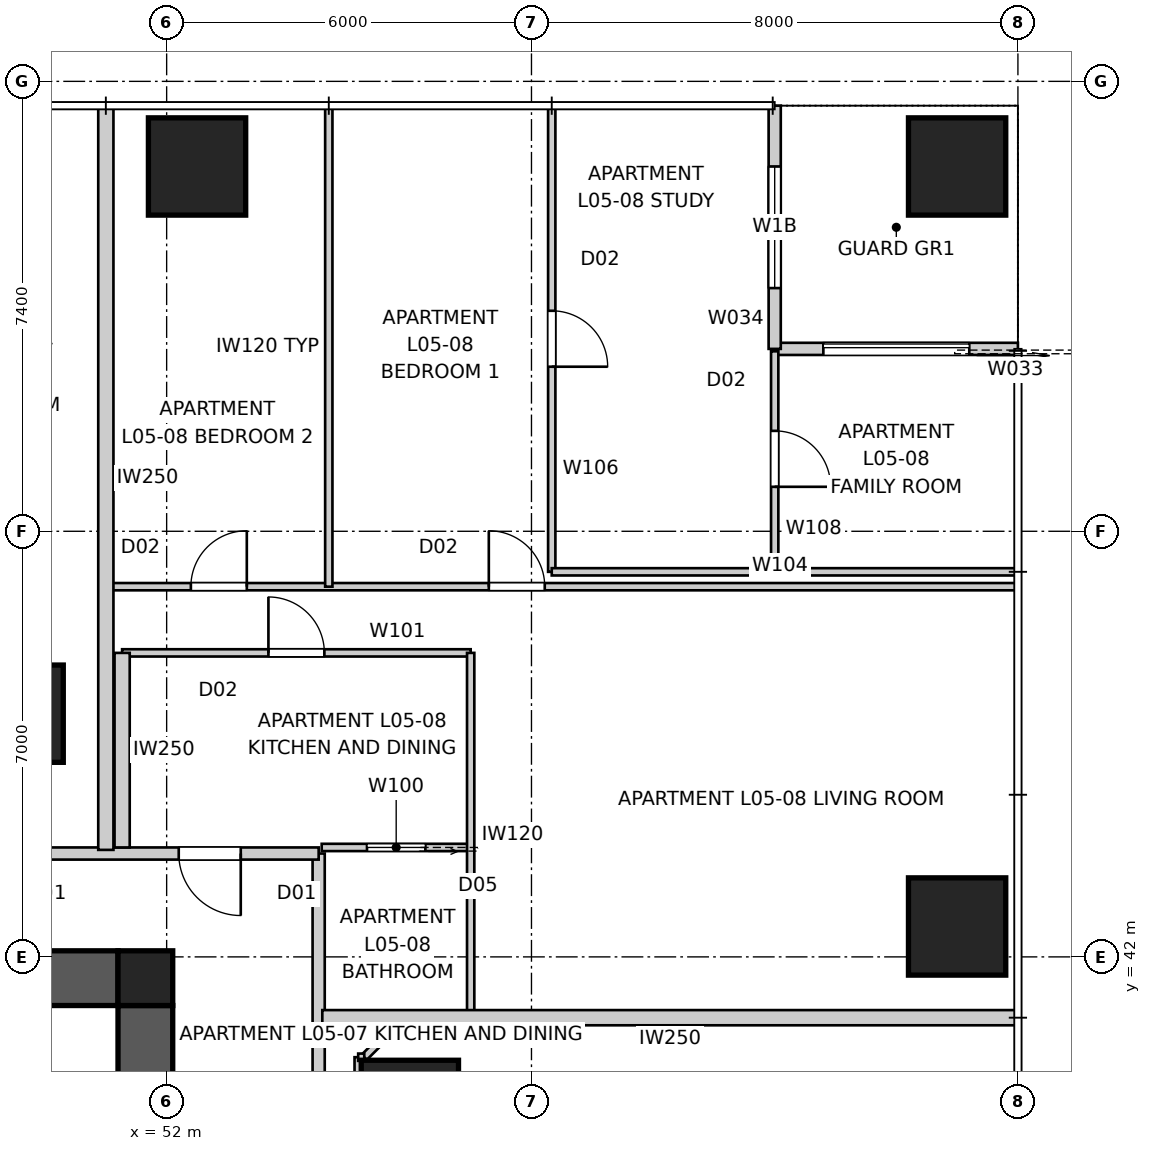
"""IFC4 building model, lengths in metres.
Left out: names, types, materials, properties, quantities, classifications, styles, units other than length and angle.
Written with IfcOpenShell. Run it as: python <this file> out.ifc"""

import sys

from ifc_helpers import new_model, si_unit, direction, frame, frame_2d, origin, origin_2d, place, context, subcontext, project, spatial, polyline, rectangle, outline, extrude, element, fill, save


model = new_model("IFC4")
c1 = context("Model", 3, precision=1e-05, world=origin(), true_north=direction((0.0, 1.0)))
c2 = subcontext(c1, "Body", "Model", "MODEL_VIEW")
j1 = project(units=[si_unit("LENGTHUNIT", "METRE"), si_unit("PLANEANGLEUNIT", "RADIAN")], contexts=[c1])
p1 = place(None, origin())
s1 = spatial("IfcSite", under=j1, at=p1, CompositionType="ELEMENT")
p2 = place(p1, origin())
s2 = spatial("IfcBuilding", under=s1, at=p2, CompositionType="ELEMENT")
p3 = place(p2, frame((0.0, 0.0, 21.8)))
s3 = spatial("IfcBuildingStorey", under=s2, at=p3, CompositionType="ELEMENT", Elevation=21.8)
p4 = place(p3, frame((28.8, 41.65, 0.0), z_axis=(0.0, 0.0, 1.0), x_axis=(1.0, 0.0, 0.0)))
e1 = element("IfcWall", 1, at=p4, inside=s3, PredefinedType="SHEAR", context=c2, shape_type="SweptSolid", body=[
    extrude(outline(polyline([(0.0, -0.45), (22.4, -0.45), (22.4, -0.025), (22.85, -0.025), (22.85, 0.025), (22.4, 0.025), (22.4, 0.45), (0.0, 0.45), (0.0, 0.025), (-0.45, 0.025), (-0.45, -0.025), (0.0, -0.025), (0.0, -0.45)])), origin(), (0.0, 0.0, 1.0), 3.4),
])
p5 = place(p3, frame((51.65, 18.8, 0.0), z_axis=(0.0, 0.0, 1.0), x_axis=(0.0, 1.0, 0.0)))
e2 = element("IfcWall", 2, at=p5, inside=s3, PredefinedType="SHEAR", context=c2, shape_type="SweptSolid", body=[
    extrude(outline(polyline([(0.0, -0.45), (22.4, -0.45), (22.4, -0.025), (22.85, -0.025), (22.85, 0.025), (22.4, 0.025), (22.4, 0.45), (0.0, 0.45), (0.0, 0.025), (-0.45, 0.025), (-0.45, -0.025), (0.0, -0.025), (0.0, -0.45)])), origin(), (0.0, 0.0, 1.0), 3.4),
])
p6 = place(p5, frame((11.14, 0.0, 0.0)))
e3 = element("IfcOpeningElement", 3, at=p6, cuts=e2, PredefinedType="OPENING", context=c2, shape_type="SweptSolid", body=[
    extrude(rectangle(XDim=1.02, YDim=2.4, at=frame_2d((0.51, 1.2))), frame((0.0, 0.46, 0.0), z_axis=(0.0, -1.0, 0.0), x_axis=(1.0, 0.0, 0.0)), (0.0, 0.0, 1.0), 0.92),
])
p7 = place(p3, frame((51.65, 41.65, 0.0), z_axis=(0.0, 0.0, 1.0), x_axis=(1.0, 0.0, 0.0)))
e4 = element("IfcColumn", 4, at=p7, inside=s3, PredefinedType="COLUMN", context=c2, shape_type="SweptSolid", body=[
    extrude(rectangle(XDim=0.9, YDim=0.9, at=origin_2d()), origin(), (0.0, 0.0, 1.0), 3.4),
])
for number, where, z_axis, x_axis in (
    (5, (65.0, 42.5, 0.0), (0.0, 0.0, 1.0), (1.0, 0.0, 0.0)),
    (6, (65.0, 55.0, 0.0), (0.0, 0.0, 1.0), (1.0, 0.0, 0.0)),
    (7, (52.5, 55.0, 0.0), (0.0, 0.0, 1.0), (1.0, 0.0, 0.0)),
    (8, (56.0, 39.5, 0.0), (0.0, 0.0, 1.0), (1.0, 0.0, 0.0)),
    (9, (49.5, 46.0, 0.0), (0.0, 0.0, 1.0), (1.0, 0.0, 0.0)),
):
    element("IfcColumn", number, at=place(p3, frame(where, z_axis=z_axis, x_axis=x_axis)), inside=s3, PredefinedType="COLUMN", context=c2, shape_type="SweptSolid", body=[
        extrude(rectangle(XDim=1.6, YDim=1.6, at=origin_2d()), origin(), (0.0, 0.0, 1.0), 3.4),
    ])
p8 = place(p3, frame((66.0, 52.0, 0.0), z_axis=(0.0, 0.0, 1.0), x_axis=(-1.0, 0.0, 0.0)))
e10 = element("IfcWall", 10, at=p8, inside=s3, PredefinedType="SOLIDWALL", context=c2, shape_type="SweptSolid", body=[
    extrude(rectangle(XDim=4.0, YDim=0.2, at=frame_2d((2.0, 0.0))), origin(), (0.0, 0.0, 1.0), 3.25),
])
p9 = place(p8, frame((0.8, 0.0, 0.0)))
e11 = element("IfcOpeningElement", 11, at=p9, cuts=e10, PredefinedType="OPENING", context=c2, shape_type="SweptSolid", body=[
    extrude(rectangle(XDim=2.4, YDim=2.1, at=frame_2d((1.2, 1.05))), frame((0.0, 0.11, 0.0), z_axis=(0.0, -1.0, 0.0), x_axis=(1.0, 0.0, 0.0)), (0.0, 0.0, 1.0), 0.22),
])
p10 = place(p3, frame((62.0, 52.0, 0.0), z_axis=(0.0, 0.0, 1.0), x_axis=(0.0, 1.0, 0.0)))
e12 = element("IfcWall", 12, at=p10, inside=s3, PredefinedType="SOLIDWALL", context=c2, shape_type="SweptSolid", body=[
    extrude(rectangle(XDim=4.0, YDim=0.2, at=frame_2d((2.0, 0.0))), origin(), (0.0, 0.0, 1.0), 3.25),
])
p11 = place(p10, frame((1.0, 0.0, 0.45)))
e13 = element("IfcOpeningElement", 13, at=p11, cuts=e12, PredefinedType="OPENING", context=c2, shape_type="SweptSolid", body=[
    extrude(rectangle(XDim=2.0, YDim=1.8, at=frame_2d((1.0, 0.9))), frame((0.0, 0.11, 0.0), z_axis=(0.0, -1.0, 0.0), x_axis=(1.0, 0.0, 0.0)), (0.0, 0.0, 1.0), 0.22),
])
p12 = place(p3, frame((54.5, 16.3, 0.0), z_axis=(0.0, 0.0, 1.0), x_axis=(0.0, 1.0, 0.0)))
e14 = element("IfcWall", 14, at=p12, inside=s3, PredefinedType="PARTITIONING", context=c2, shape_type="SweptSolid", body=[
    extrude(rectangle(XDim=27.4, YDim=0.2, at=frame_2d((13.7, 0.0))), origin(), (0.0, 0.0, 1.0), 3.25),
])
p13 = place(p12, frame((20.998, 0.0, 0.0)))
e15 = element("IfcOpeningElement", 15, at=p13, cuts=e14, PredefinedType="OPENING", context=c2, shape_type="SweptSolid", body=[
    extrude(rectangle(XDim=1.02, YDim=2.34, at=frame_2d((0.51, 1.17))), frame((0.0, 0.11, 0.0), z_axis=(0.0, -1.0, 0.0), x_axis=(1.0, 0.0, 0.0)), (0.0, 0.0, 1.0), 0.22),
])
p14 = place(p12, frame((11.119, 0.0, 0.0)))
e16 = element("IfcOpeningElement", 16, at=p14, cuts=e14, PredefinedType="OPENING", context=c2, shape_type="SweptSolid", body=[
    extrude(rectangle(XDim=1.02, YDim=2.34, at=frame_2d((0.51, 1.17))), frame((0.0, 0.11, 0.0), z_axis=(0.0, -1.0, 0.0), x_axis=(1.0, 0.0, 0.0)), (0.0, 0.0, 1.0), 0.22),
])
p15 = place(p12, frame((1.015, 0.0, 0.0)))
e17 = element("IfcOpeningElement", 17, at=p15, cuts=e14, PredefinedType="OPENING", context=c2, shape_type="SweptSolid", body=[
    extrude(rectangle(XDim=1.02, YDim=2.34, at=frame_2d((0.51, 1.17))), frame((0.0, 0.11, 0.0), z_axis=(0.0, -1.0, 0.0), x_axis=(1.0, 0.0, 0.0)), (0.0, 0.0, 1.0), 0.22),
])
p16 = place(p3, frame((54.5, 43.7, 0.0), z_axis=(0.0, 0.0, 1.0), x_axis=(-1.0, 0.0, 0.0)))
e18 = element("IfcWall", 18, at=p16, inside=s3, PredefinedType="PARTITIONING", context=c2, shape_type="SweptSolid", body=[
    extrude(rectangle(XDim=29.0, YDim=0.2, at=frame_2d((14.5, 0.0))), origin(), (0.0, 0.0, 1.0), 3.25),
])
p17 = place(p16, frame((22.253, 0.0, 0.0)))
e19 = element("IfcOpeningElement", 19, at=p17, cuts=e18, PredefinedType="OPENING", context=c2, shape_type="SweptSolid", body=[
    extrude(rectangle(XDim=1.02, YDim=2.34, at=frame_2d((0.51, 1.17))), frame((0.0, 0.11, 0.0), z_axis=(0.0, -1.0, 0.0), x_axis=(1.0, 0.0, 0.0)), (0.0, 0.0, 1.0), 0.22),
])
p18 = place(p16, frame((5.393, 0.0, 0.0)))
e20 = element("IfcOpeningElement", 20, at=p18, cuts=e18, PredefinedType="OPENING", context=c2, shape_type="SweptSolid", body=[
    extrude(rectangle(XDim=1.02, YDim=2.34, at=frame_2d((0.51, 1.17))), frame((0.0, 0.11, 0.0), z_axis=(0.0, -1.0, 0.0), x_axis=(1.0, 0.0, 0.0)), (0.0, 0.0, 1.0), 0.22),
])
p19 = place(p16, frame((1.281, 0.0, 0.0)))
e21 = element("IfcOpeningElement", 21, at=p19, cuts=e18, PredefinedType="OPENING", context=c2, shape_type="SweptSolid", body=[
    extrude(rectangle(XDim=1.02, YDim=2.34, at=frame_2d((0.51, 1.17))), frame((0.0, 0.11, 0.0), z_axis=(0.0, -1.0, 0.0), x_axis=(1.0, 0.0, 0.0)), (0.0, 0.0, 1.0), 0.22),
])
p20 = place(p3, frame((66.0, 41.0, 0.0), z_axis=(0.0, 0.0, 1.0), x_axis=(-1.0, 0.0, 0.0)))
e22 = element("IfcWall", 22, at=p20, inside=s3, PredefinedType="PARTITIONING", context=c2, shape_type="SweptSolid", body=[
    extrude(rectangle(XDim=11.44, YDim=0.25, at=frame_2d((5.72, 0.0))), origin(), (0.0, 0.0, 1.0), 3.25),
])
p21 = place(p3, frame((51.0, 56.0, 0.0), z_axis=(0.0, 0.0, 1.0), x_axis=(0.0, -1.0, 0.0)))
e23 = element("IfcWall", 23, at=p21, inside=s3, PredefinedType="PARTITIONING", context=c2, shape_type="SweptSolid", body=[
    extrude(rectangle(XDim=12.24, YDim=0.25, at=frame_2d((6.12, 0.0))), origin(), (0.0, 0.0, 1.0), 3.25),
])
p22 = place(p3, frame((55.9, 41.0, 0.0), z_axis=(0.0, 0.0, 1.0), x_axis=(-0.707106781187, -0.707106781187, 0.0)))
e24 = element("IfcWall", 24, at=p22, inside=s3, PredefinedType="PARTITIONING", context=c2, shape_type="SweptSolid", body=[
    extrude(rectangle(XDim=0.919, YDim=0.12, at=frame_2d((0.459, 0.0))), origin(), (0.0, 0.0, 1.0), 3.25),
])
p23 = place(p3, frame((55.15, 40.35, 0.0), z_axis=(0.0, 0.0, 1.0), x_axis=(0.0, -1.0, 0.0)))
e25 = element("IfcWall", 25, at=p23, inside=s3, PredefinedType="PARTITIONING", context=c2, shape_type="SweptSolid", body=[
    extrude(rectangle(XDim=1.7, YDim=0.12, at=frame_2d((0.85, 0.0))), origin(), (0.0, 0.0, 1.0), 3.25),
])
p24 = place(p3, frame((57.0, 43.8, 0.0), z_axis=(0.0, 0.0, 1.0), x_axis=(-1.0, 0.0, 0.0)))
e26 = element("IfcWall", 26, at=p24, inside=s3, PredefinedType="PARTITIONING", context=c2, shape_type="SweptSolid", body=[
    extrude(rectangle(XDim=2.45, YDim=0.12, at=frame_2d((1.225, 0.0))), origin(), (0.0, 0.0, 1.0), 3.25),
])
p25 = place(p24, frame((0.745, 0.0, 0.0)))
e27 = element("IfcOpeningElement", 27, at=p25, cuts=e26, PredefinedType="OPENING", context=c2, shape_type="SweptSolid", body=[
    extrude(rectangle(XDim=0.96, YDim=2.1, at=frame_2d((0.48, 1.05))), frame((0.0, 0.07, 0.0), z_axis=(0.0, -1.0, 0.0), x_axis=(1.0, 0.0, 0.0)), (0.0, 0.0, 1.0), 0.14),
])
p26 = place(p3, frame((51.268, 47.0, 0.0), z_axis=(0.0, 0.0, 1.0), x_axis=(1.0, 0.0, 0.0)))
e28 = element("IfcWall", 28, at=p26, inside=s3, PredefinedType="PARTITIONING", context=c2, shape_type="SweptSolid", body=[
    extrude(rectangle(XDim=5.732, YDim=0.12, at=frame_2d((2.866, 0.0))), origin(), (0.0, 0.0, 1.0), 3.25),
])
p27 = place(p26, frame((2.406, 0.0, 0.0)))
e29 = element("IfcOpeningElement", 29, at=p27, cuts=e28, PredefinedType="OPENING", context=c2, shape_type="SweptSolid", body=[
    extrude(rectangle(XDim=0.92, YDim=2.34, at=frame_2d((0.46, 1.17))), frame((0.0, 0.07, 0.0), z_axis=(0.0, -1.0, 0.0), x_axis=(1.0, 0.0, 0.0)), (0.0, 0.0, 1.0), 0.14),
])
p28 = place(p3, frame((57.0, 47.0, 0.0), z_axis=(0.0, 0.0, 1.0), x_axis=(0.0, -1.0, 0.0)))
e30 = element("IfcWall", 30, at=p28, inside=s3, PredefinedType="PARTITIONING", context=c2, shape_type="SweptSolid", body=[
    extrude(rectangle(XDim=6.0, YDim=0.12, at=frame_2d((3.0, 0.0))), origin(), (0.0, 0.0, 1.0), 3.25),
])
p29 = place(p3, frame((51.268, 43.8, 0.0), z_axis=(0.0, 0.0, 1.0), x_axis=(0.0, 1.0, 0.0)))
e31 = element("IfcWall", 31, at=p29, inside=s3, PredefinedType="PARTITIONING", context=c2, shape_type="SweptSolid", body=[
    extrude(rectangle(XDim=3.2, YDim=0.25, at=frame_2d((1.6, 0.0))), origin(), (0.0, 0.0, 1.0), 3.25),
])
p30 = place(p3, frame((51.0, 48.089, 0.0), z_axis=(0.0, 0.0, 1.0), x_axis=(1.0, 0.0, 0.0)))
e32 = element("IfcWall", 32, at=p30, inside=s3, PredefinedType="PARTITIONING", context=c2, shape_type="SweptSolid", body=[
    extrude(rectangle(XDim=14.96, YDim=0.12, at=frame_2d((7.48, 0.0))), origin(), (0.0, 0.0, 1.0), 3.25),
])
p31 = place(p30, frame((6.298, 0.0, 0.0)))
e33 = element("IfcOpeningElement", 33, at=p31, cuts=e32, PredefinedType="OPENING", context=c2, shape_type="SweptSolid", body=[
    extrude(rectangle(XDim=0.92, YDim=2.34, at=frame_2d((0.46, 1.17))), frame((0.0, 0.07, 0.0), z_axis=(0.0, -1.0, 0.0), x_axis=(1.0, 0.0, 0.0)), (0.0, 0.0, 1.0), 0.14),
])
p32 = place(p30, frame((1.398, 0.0, 0.0)))
e34 = element("IfcOpeningElement", 34, at=p32, cuts=e32, PredefinedType="OPENING", context=c2, shape_type="SweptSolid", body=[
    extrude(rectangle(XDim=0.92, YDim=2.34, at=frame_2d((0.46, 1.17))), frame((0.0, 0.07, 0.0), z_axis=(0.0, -1.0, 0.0), x_axis=(1.0, 0.0, 0.0)), (0.0, 0.0, 1.0), 0.14),
])
p33 = place(p3, frame((54.667, 48.089, 0.0), z_axis=(0.0, 0.0, 1.0), x_axis=(0.0, 1.0, 0.0)))
e35 = element("IfcWall", 35, at=p33, inside=s3, PredefinedType="PARTITIONING", context=c2, shape_type="SweptSolid", body=[
    extrude(rectangle(XDim=7.871, YDim=0.12, at=frame_2d((3.936, 0.0))), origin(), (0.0, 0.0, 1.0), 2.638),
])
p34 = place(p3, frame((58.333, 55.96, 0.0), z_axis=(0.0, 0.0, 1.0), x_axis=(0.0, -1.0, 0.0)))
e36 = element("IfcWall", 36, at=p34, inside=s3, PredefinedType="PARTITIONING", context=c2, shape_type="SweptSolid", body=[
    extrude(rectangle(XDim=7.627, YDim=0.12, at=frame_2d((3.813, 0.0))), origin(), (0.0, 0.0, 1.0), 3.25),
])
p35 = place(p34, frame((3.333, 0.0, 0.0)))
e37 = element("IfcOpeningElement", 37, at=p35, cuts=e36, PredefinedType="OPENING", context=c2, shape_type="SweptSolid", body=[
    extrude(rectangle(XDim=0.92, YDim=2.34, at=frame_2d((0.46, 1.17))), frame((0.0, 0.07, 0.0), z_axis=(0.0, -1.0, 0.0), x_axis=(1.0, 0.0, 0.0)), (0.0, 0.0, 1.0), 0.14),
])
p36 = place(p3, frame((58.333, 48.333, 0.0), z_axis=(0.0, 0.0, 1.0), x_axis=(1.0, 0.0, 0.0)))
e38 = element("IfcWall", 38, at=p36, inside=s3, PredefinedType="PARTITIONING", context=c2, shape_type="SweptSolid", body=[
    extrude(rectangle(XDim=7.627, YDim=0.12, at=frame_2d((3.813, 0.0))), origin(), (0.0, 0.0, 1.0), 3.25),
])
p37 = place(p3, frame((62.0, 51.96, 0.0), z_axis=(0.0, 0.0, 1.0), x_axis=(0.0, -1.0, 0.0)))
e39 = element("IfcWall", 39, at=p37, inside=s3, PredefinedType="PARTITIONING", context=c2, shape_type="SweptSolid", body=[
    extrude(rectangle(XDim=3.627, YDim=0.12, at=frame_2d((1.813, 0.0))), origin(), (0.0, 0.0, 1.0), 3.25),
])
p38 = place(p37, frame((1.308, 0.0, 0.0)))
e40 = element("IfcOpeningElement", 40, at=p38, cuts=e39, PredefinedType="OPENING", context=c2, shape_type="SweptSolid", body=[
    extrude(rectangle(XDim=0.92, YDim=2.34, at=frame_2d((0.46, 1.17))), frame((0.0, 0.07, 0.0), z_axis=(0.0, -1.0, 0.0), x_axis=(1.0, 0.0, 0.0)), (0.0, 0.0, 1.0), 0.14),
])
p39 = place(p3, frame((55.15, 40.35, 0.0), z_axis=(0.0, 0.0, 1.0), x_axis=(1.0, 0.0, 0.0)))
e41 = element("IfcWall", 41, at=p39, inside=s3, PredefinedType="PARTITIONING", context=c2, shape_type="SweptSolid", body=[
    extrude(rectangle(XDim=0.1, YDim=0.12, at=frame_2d((0.05, 0.0))), origin(), (0.0, 0.0, 1.0), 3.25),
])
p40 = place(p9, origin())
e42 = element("IfcDoor", 42, at=p40, inside=s3, OperationType="SLIDING_TO_LEFT", PredefinedType="DOOR", context=c2, shape_type="SweptSolid", body=[
    extrude(rectangle(XDim=2.4, YDim=2.1, at=frame_2d((1.2, 1.05))), frame((0.0, 0.025, 0.0), z_axis=(0.0, -1.0, 0.0), x_axis=(1.0, 0.0, 0.0)), (0.0, 0.0, 1.0), 0.05),
])
fill(e11, e42)
p41 = place(p11, origin())
e43 = element("IfcWindow", 43, at=p41, inside=s3, PartitioningType="SINGLE_PANEL", PredefinedType="WINDOW", context=c2, shape_type="SweptSolid", body=[
    extrude(rectangle(XDim=2.0, YDim=1.8, at=frame_2d((1.0, 0.9))), frame((0.0, 0.03, 0.0), z_axis=(0.0, -1.0, 0.0), x_axis=(1.0, 0.0, 0.0)), (0.0, 0.0, 1.0), 0.06),
])
fill(e13, e43)
p42 = place(p19, origin())
e44 = element("IfcDoor", 44, at=p42, inside=s3, OperationType="SINGLE_SWING_LEFT", PredefinedType="DOOR", context=c2, shape_type="SweptSolid", body=[
    extrude(rectangle(XDim=1.02, YDim=2.34, at=frame_2d((0.51, 1.17))), frame((0.0, 0.025, 0.0), z_axis=(0.0, -1.0, 0.0), x_axis=(1.0, 0.0, 0.0)), (0.0, 0.0, 1.0), 0.05),
])
fill(e21, e44)
p43 = place(p27, origin())
e45 = element("IfcDoor", 45, at=p43, inside=s3, OperationType="SINGLE_SWING_LEFT", PredefinedType="DOOR", context=c2, shape_type="SweptSolid", body=[
    extrude(rectangle(XDim=0.92, YDim=2.34, at=frame_2d((0.46, 1.17))), frame((0.0, 0.025, 0.0), z_axis=(0.0, -1.0, 0.0), x_axis=(1.0, 0.0, 0.0)), (0.0, 0.0, 1.0), 0.05),
])
fill(e29, e45)
p44 = place(p25, origin())
e46 = element("IfcDoor", 46, at=p44, inside=s3, OperationType="SLIDING_TO_LEFT", PredefinedType="DOOR", context=c2, shape_type="SweptSolid", body=[
    extrude(rectangle(XDim=0.96, YDim=2.1, at=frame_2d((0.48, 1.05))), frame((0.0, 0.025, 0.0), z_axis=(0.0, -1.0, 0.0), x_axis=(1.0, 0.0, 0.0)), (0.0, 0.0, 1.0), 0.05),
])
fill(e27, e46)
p45 = place(p31, origin())
e47 = element("IfcDoor", 47, at=p45, inside=s3, OperationType="SINGLE_SWING_LEFT", PredefinedType="DOOR", context=c2, shape_type="SweptSolid", body=[
    extrude(rectangle(XDim=0.92, YDim=2.34, at=frame_2d((0.46, 1.17))), frame((0.0, 0.025, 0.0), z_axis=(0.0, -1.0, 0.0), x_axis=(1.0, 0.0, 0.0)), (0.0, 0.0, 1.0), 0.05),
])
fill(e33, e47)
p46 = place(p32, origin())
e48 = element("IfcDoor", 48, at=p46, inside=s3, OperationType="SINGLE_SWING_RIGHT", PredefinedType="DOOR", context=c2, shape_type="SweptSolid", body=[
    extrude(rectangle(XDim=0.92, YDim=2.34, at=frame_2d((0.46, 1.17))), frame((0.0, 0.025, 0.0), z_axis=(0.0, -1.0, 0.0), x_axis=(1.0, 0.0, 0.0)), (0.0, 0.0, 1.0), 0.05),
])
fill(e34, e48)
p47 = place(p35, origin())
e49 = element("IfcDoor", 49, at=p47, inside=s3, OperationType="SINGLE_SWING_RIGHT", PredefinedType="DOOR", context=c2, shape_type="SweptSolid", body=[
    extrude(rectangle(XDim=0.92, YDim=2.34, at=frame_2d((0.46, 1.17))), frame((0.0, 0.025, 0.0), z_axis=(0.0, -1.0, 0.0), x_axis=(1.0, 0.0, 0.0)), (0.0, 0.0, 1.0), 0.05),
])
fill(e37, e49)
p48 = place(p38, origin())
e50 = element("IfcDoor", 50, at=p48, inside=s3, OperationType="SINGLE_SWING_RIGHT", PredefinedType="DOOR", context=c2, shape_type="SweptSolid", body=[
    extrude(rectangle(XDim=0.92, YDim=2.34, at=frame_2d((0.46, 1.17))), frame((0.0, 0.025, 0.0), z_axis=(0.0, -1.0, 0.0), x_axis=(1.0, 0.0, 0.0)), (0.0, 0.0, 1.0), 0.05),
])
fill(e40, e50)
save(model, sys.argv[1])
